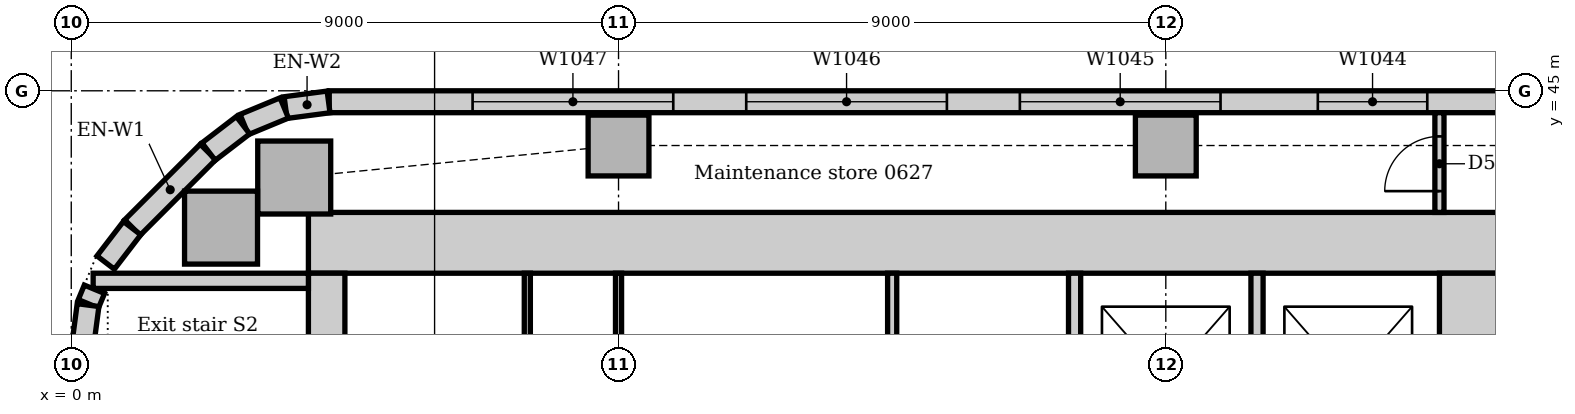
"""IFC4 building model, lengths in metres.
Left out: names, types, materials, properties, quantities, classifications, styles, units other than length and angle.
Written with IfcOpenShell. Run it as: python <this file> out.ifc"""

import sys

from ifc_helpers import new_model, si_unit, direction, frame, frame_2d, origin, origin_2d, place, context, subcontext, project, spatial, rectangle, extrude, element, fill, save


model = new_model("IFC4")
c1 = context("Model", 3, precision=1e-05, world=origin(), true_north=direction((0.0, 1.0)))
c2 = subcontext(c1, "Body", "Model", "MODEL_VIEW")
j1 = project(units=[si_unit("LENGTHUNIT", "METRE"), si_unit("PLANEANGLEUNIT", "RADIAN")], contexts=[c1])
p1 = place(None, origin())
s1 = spatial("IfcSite", under=j1, at=p1, CompositionType="ELEMENT")
p2 = place(p1, origin())
s2 = spatial("IfcBuilding", under=s1, at=p2, CompositionType="ELEMENT")
p3 = place(p2, frame((0.0, 0.0, 30.0)))
s3 = spatial("IfcBuildingStorey", under=s2, at=p3, CompositionType="ELEMENT", Elevation=30.0)
p4 = place(p3, frame((23.5, 42.5, 0.0), z_axis=(0.0, 0.0, 1.0), x_axis=(-1.0, 0.0, 0.0)))
e1 = element("IfcWall", 1, at=p4, inside=s3, PredefinedType="SOLIDWALL", context=c2, shape_type="SweptSolid", body=[
    extrude(rectangle(XDim=19.6, YDim=1.0, at=frame_2d((9.8, 0.0))), origin(), (0.0, 0.0, 1.0), 4.0),
])
p5 = place(p3, frame((23.0, 31.5, 0.0), z_axis=(0.0, 0.0, 1.0), x_axis=(0.0, 1.0, 0.0)))
e2 = element("IfcWall", 2, at=p5, inside=s3, PredefinedType="SOLIDWALL", context=c2, shape_type="SweptSolid", body=[
    extrude(rectangle(XDim=10.5, YDim=1.0, at=frame_2d((5.25, 0.0))), origin(), (0.0, 0.0, 1.0), 4.0),
])
p6 = place(p5, frame((3.15, 0.0, 0.0)))
e3 = element("IfcOpeningElement", 3, at=p6, cuts=e2, PredefinedType="OPENING", context=c2, shape_type="SweptSolid", body=[
    extrude(rectangle(XDim=1.0, YDim=2.1, at=frame_2d((0.5, 1.05))), frame((0.0, 0.51, 0.0), z_axis=(0.0, -1.0, 0.0), x_axis=(1.0, 0.0, 0.0)), (0.0, 0.0, 1.0), 1.02),
])
p7 = place(p5, frame((5.2, 0.0, 0.0)))
e4 = element("IfcOpeningElement", 4, at=p7, cuts=e2, PredefinedType="OPENING", context=c2, shape_type="SweptSolid", body=[
    extrude(rectangle(XDim=1.0, YDim=2.1, at=frame_2d((0.5, 1.05))), frame((0.0, 0.51, 0.0), z_axis=(0.0, -1.0, 0.0), x_axis=(1.0, 0.0, 0.0)), (0.0, 0.0, 1.0), 1.02),
])
p8 = place(p3, frame((4.2, 42.0, 0.0), z_axis=(0.0, 0.0, 1.0), x_axis=(0.0, -1.0, 0.0)))
e5 = element("IfcWall", 5, at=p8, inside=s3, PredefinedType="SOLIDWALL", context=c2, shape_type="SweptSolid", body=[
    extrude(rectangle(XDim=10.5, YDim=0.6, at=frame_2d((5.25, 0.0))), origin(), (0.0, 0.0, 1.0), 4.0),
])
p9 = place(p8, frame((5.3, 0.0, 0.0)))
e6 = element("IfcOpeningElement", 6, at=p9, cuts=e5, PredefinedType="OPENING", context=c2, shape_type="SweptSolid", body=[
    extrude(rectangle(XDim=1.0, YDim=2.1, at=frame_2d((0.5, 1.05))), frame((0.0, 0.31, 0.0), z_axis=(0.0, -1.0, 0.0), x_axis=(1.0, 0.0, 0.0)), (0.0, 0.0, 1.0), 0.62),
])
p10 = place(p3, frame((3.9, 41.875, 0.0), z_axis=(0.0, 0.0, 1.0), x_axis=(-1.0, 0.0, 0.0)))
e7 = element("IfcWall", 7, at=p10, inside=s3, PredefinedType="SOLIDWALL", context=c2, shape_type="SweptSolid", body=[
    extrude(rectangle(XDim=3.54, YDim=0.25, at=frame_2d((1.77, 0.0))), origin(), (0.0, 0.0, 1.0), 4.0),
])
for number, where, z_axis, x_axis in (
    (8, (3.667, 43.574, 0.0), (0.0, 0.0, 1.0), (1.0, 0.0, 0.0)),
    (9, (2.463, 42.75, 0.0), (0.0, 0.0, 1.0), (1.0, 0.0, 0.0)),
):
    element("IfcColumn", number, at=place(p3, frame(where, z_axis=z_axis, x_axis=x_axis)), inside=s3, PredefinedType="COLUMN", context=c2, shape_type="SweptSolid", body=[
        extrude(rectangle(XDim=1.2, YDim=1.2, at=origin_2d()), origin(), (0.0, 0.0, 1.0), 3.85),
    ])
for number, where, z_axis, x_axis in (
    (10, (9.0, 44.1, 0.0), (0.0, 0.0, 1.0), (1.0, 0.0, 0.0)),
    (11, (18.0, 44.1, 0.0), (0.0, 0.0, 1.0), (1.0, 0.0, 0.0)),
):
    element("IfcColumn", number, at=place(p3, frame(where, z_axis=z_axis, x_axis=x_axis)), inside=s3, PredefinedType="COLUMN", context=c2, shape_type="SweptSolid", body=[
        extrude(rectangle(XDim=1.0, YDim=1.0, at=origin_2d()), origin(), (0.0, 0.0, 1.0), 3.85),
    ])
p11 = place(p3, frame((48.257, 44.82, 0.0), z_axis=(0.0, 0.0, 1.0), x_axis=(-1.0, 0.0, 0.0)))
e12 = element("IfcWall", 12, at=p11, inside=s3, PredefinedType="STANDARD", context=c2, shape_type="SweptSolid", body=[
    extrude(rectangle(XDim=44.015, YDim=0.36, at=frame_2d((22.007, 0.0))), origin(), (0.0, 0.0, 1.0), 3.85),
])
p12 = place(p11, frame((2.057, 0.0, 0.9)))
e13 = element("IfcOpeningElement", 13, at=p12, cuts=e12, PredefinedType="OPENING", context=c2, shape_type="SweptSolid", body=[
    extrude(rectangle(XDim=3.3, YDim=1.6, at=frame_2d((1.65, 0.8))), frame((0.0, 0.19, 0.0), z_axis=(0.0, -1.0, 0.0), x_axis=(1.0, 0.0, 0.0)), (0.0, 0.0, 1.0), 0.38),
])
p13 = place(p11, frame((6.857, 0.0, 0.9)))
e14 = element("IfcOpeningElement", 14, at=p13, cuts=e12, PredefinedType="OPENING", context=c2, shape_type="SweptSolid", body=[
    extrude(rectangle(XDim=3.3, YDim=1.6, at=frame_2d((1.65, 0.8))), frame((0.0, 0.19, 0.0), z_axis=(0.0, -1.0, 0.0), x_axis=(1.0, 0.0, 0.0)), (0.0, 0.0, 1.0), 0.38),
])
p14 = place(p11, frame((11.357, 0.0, 0.9)))
e15 = element("IfcOpeningElement", 15, at=p14, cuts=e12, PredefinedType="OPENING", context=c2, shape_type="SweptSolid", body=[
    extrude(rectangle(XDim=3.3, YDim=1.6, at=frame_2d((1.65, 0.8))), frame((0.0, 0.19, 0.0), z_axis=(0.0, -1.0, 0.0), x_axis=(1.0, 0.0, 0.0)), (0.0, 0.0, 1.0), 0.38),
])
p15 = place(p11, frame((15.857, 0.0, 0.9)))
e16 = element("IfcOpeningElement", 16, at=p15, cuts=e12, PredefinedType="OPENING", context=c2, shape_type="SweptSolid", body=[
    extrude(rectangle(XDim=3.3, YDim=1.6, at=frame_2d((1.65, 0.8))), frame((0.0, 0.19, 0.0), z_axis=(0.0, -1.0, 0.0), x_axis=(1.0, 0.0, 0.0)), (0.0, 0.0, 1.0), 0.38),
])
p16 = place(p11, frame((20.357, 0.0, 0.9)))
e17 = element("IfcOpeningElement", 17, at=p16, cuts=e12, PredefinedType="OPENING", context=c2, shape_type="SweptSolid", body=[
    extrude(rectangle(XDim=3.3, YDim=1.6, at=frame_2d((1.65, 0.8))), frame((0.0, 0.19, 0.0), z_axis=(0.0, -1.0, 0.0), x_axis=(1.0, 0.0, 0.0)), (0.0, 0.0, 1.0), 0.38),
])
p17 = place(p11, frame((25.957, 0.0, 0.9)))
e18 = element("IfcOpeningElement", 18, at=p17, cuts=e12, PredefinedType="OPENING", context=c2, shape_type="SweptSolid", body=[
    extrude(rectangle(XDim=1.8, YDim=1.6, at=frame_2d((0.9, 0.8))), frame((0.0, 0.19, 0.0), z_axis=(0.0, -1.0, 0.0), x_axis=(1.0, 0.0, 0.0)), (0.0, 0.0, 1.0), 0.38),
])
p18 = place(p11, frame((29.357, 0.0, 0.9)))
e19 = element("IfcOpeningElement", 19, at=p18, cuts=e12, PredefinedType="OPENING", context=c2, shape_type="SweptSolid", body=[
    extrude(rectangle(XDim=3.3, YDim=1.6, at=frame_2d((1.65, 0.8))), frame((0.0, 0.19, 0.0), z_axis=(0.0, -1.0, 0.0), x_axis=(1.0, 0.0, 0.0)), (0.0, 0.0, 1.0), 0.38),
])
p19 = place(p11, frame((33.857, 0.0, 0.9)))
e20 = element("IfcOpeningElement", 20, at=p19, cuts=e12, PredefinedType="OPENING", context=c2, shape_type="SweptSolid", body=[
    extrude(rectangle(XDim=3.3, YDim=1.6, at=frame_2d((1.65, 0.8))), frame((0.0, 0.19, 0.0), z_axis=(0.0, -1.0, 0.0), x_axis=(1.0, 0.0, 0.0)), (0.0, 0.0, 1.0), 0.38),
])
p20 = place(p11, frame((38.357, 0.0, 0.9)))
e21 = element("IfcOpeningElement", 21, at=p20, cuts=e12, PredefinedType="OPENING", context=c2, shape_type="SweptSolid", body=[
    extrude(rectangle(XDim=3.3, YDim=1.6, at=frame_2d((1.65, 0.8))), frame((0.0, 0.19, 0.0), z_axis=(0.0, -1.0, 0.0), x_axis=(1.0, 0.0, 0.0)), (0.0, 0.0, 1.0), 0.38),
])
p21 = place(p3, frame((2.249, 43.994, 0.0), z_axis=(0.0, 0.0, 1.0), x_axis=(-0.707106781187, -0.707106781187, 0.0)))
e22 = element("IfcWall", 22, at=p21, inside=s3, PredefinedType="STANDARD", context=c2, shape_type="SweptSolid", body=[
    extrude(rectangle(XDim=1.757, YDim=0.36, at=frame_2d((0.879, 0.0))), origin(), (0.0, 0.0, 1.0), 3.85),
])
for number, where, z_axis, x_axis in (
    (23, (4.231, 44.817, 0.0), (0.0, 0.0, 1.0), (-0.991, -0.131, 0.0)),
    (24, (3.503, 44.718, 0.0), (0.0, 0.0, 1.0), (-0.924, -0.383, 0.0)),
):
    element("IfcWall", number, at=place(p3, frame(where, z_axis=z_axis, x_axis=x_axis)), inside=s3, PredefinedType="STANDARD", context=c2, shape_type="SweptSolid", body=[
        extrude(rectangle(XDim=0.713, YDim=0.36, at=frame_2d((0.356, 0.0))), origin(), (0.0, 0.0, 1.0), 3.85),
    ])
for number, where, z_axis, x_axis in (
    (25, (2.825, 44.434, 0.0), (0.0, 0.0, 1.0), (-0.793, -0.609, 0.0)),
    (26, (1.0, 42.741, 0.0), (0.0, 0.0, 1.0), (-0.609, -0.793, 0.0)),
):
    element("IfcWall", number, at=place(p3, frame(where, z_axis=z_axis, x_axis=x_axis)), inside=s3, PredefinedType="STANDARD", context=c2, shape_type="SweptSolid", body=[
        extrude(rectangle(XDim=0.713, YDim=0.36, at=frame_2d((0.357, 0.0))), origin(), (0.0, 0.0, 1.0), 3.85),
    ])
p22 = place(p3, frame((0.381, 41.736, 0.0), z_axis=(0.0, 0.0, 1.0), x_axis=(-0.382773360986, -0.923842277729, 0.0)))
e27 = element("IfcWall", 27, at=p22, inside=s3, PredefinedType="STANDARD", context=c2, shape_type="SweptSolid", body=[
    extrude(rectangle(XDim=0.258, YDim=0.36, at=frame_2d((0.129, 0.0))), origin(), (0.0, 0.0, 1.0), 3.85),
])
p23 = place(p3, frame((0.276, 41.476, 0.0), z_axis=(0.0, 0.0, 1.0), x_axis=(-0.13055608231, -0.99144092581, 0.0)))
e28 = element("IfcWall", 28, at=p23, inside=s3, PredefinedType="STANDARD", context=c2, shape_type="SweptSolid", body=[
    extrude(rectangle(XDim=0.713, YDim=0.36, at=frame_2d((0.356, 0.0))), origin(), (0.0, 0.0, 1.0), 3.85),
])
for number, where, z_axis, x_axis in (
    (29, (16.5, 38.6, 0.0), (0.0, 0.0, 1.0), (0.0, 1.0, 0.0)),
    (30, (19.5, 38.6, 0.0), (0.0, 0.0, 1.0), (0.0, 1.0, 0.0)),
):
    element("IfcWall", number, at=place(p3, frame(where, z_axis=z_axis, x_axis=x_axis)), inside=s3, PredefinedType="PARTITIONING", context=c2, shape_type="SweptSolid", body=[
        extrude(rectangle(XDim=3.4, YDim=0.2, at=frame_2d((1.7, 0.0))), origin(), (0.0, 0.0, 1.0), 3.85),
    ])
p24 = place(p3, frame((22.5, 43.0, 0.0), z_axis=(0.0, 0.0, 1.0), x_axis=(0.0, 1.0, 0.0)))
e31 = element("IfcWall", 31, at=p24, inside=s3, PredefinedType="PARTITIONING", context=c2, shape_type="SweptSolid", body=[
    extrude(rectangle(XDim=1.64, YDim=0.15, at=frame_2d((0.82, 0.0))), origin(), (0.0, 0.0, 1.0), 3.85),
])
p25 = place(p24, frame((0.35, 0.0, 0.0)))
e32 = element("IfcOpeningElement", 32, at=p25, cuts=e31, PredefinedType="OPENING", context=c2, shape_type="SweptSolid", body=[
    extrude(rectangle(XDim=0.9, YDim=2.1, at=frame_2d((0.45, 1.05))), frame((0.0, 0.085, 0.0), z_axis=(0.0, -1.0, 0.0), x_axis=(1.0, 0.0, 0.0)), (0.0, 0.0, 1.0), 0.17),
])
p26 = place(p3, frame((13.5, 38.575, 0.0), z_axis=(0.0, 0.0, 1.0), x_axis=(0.0, 1.0, 0.0)))
e33 = element("IfcWall", 33, at=p26, inside=s3, PredefinedType="PARTITIONING", context=c2, shape_type="SweptSolid", body=[
    extrude(rectangle(XDim=3.425, YDim=0.15, at=frame_2d((1.712, 0.0))), origin(), (0.0, 0.0, 1.0), 3.85),
])
for number, where, z_axis, x_axis in (
    (34, (7.5, 38.575, 0.0), (0.0, 0.0, 1.0), (0.0, 1.0, 0.0)),
    (35, (9.0, 38.575, 0.0), (0.0, 0.0, 1.0), (0.0, 1.0, 0.0)),
):
    element("IfcWall", number, at=place(p3, frame(where, z_axis=z_axis, x_axis=x_axis)), inside=s3, PredefinedType="PARTITIONING", context=c2, shape_type="SweptSolid", body=[
        extrude(rectangle(XDim=3.425, YDim=0.1, at=frame_2d((1.712, 0.0))), origin(), (0.0, 0.0, 1.0), 3.85),
    ])
p27 = place(p17, origin())
e36 = element("IfcWindow", 36, at=p27, inside=s3, PartitioningType="SINGLE_PANEL", PredefinedType="WINDOW", context=c2, shape_type="SweptSolid", body=[
    extrude(rectangle(XDim=1.8, YDim=1.6, at=frame_2d((0.9, 0.8))), frame((0.0, 0.13, 0.0), z_axis=(0.0, -1.0, 0.0), x_axis=(1.0, 0.0, 0.0)), (0.0, 0.0, 1.0), 0.06),
])
fill(e18, e36)
p28 = place(p18, origin())
e37 = element("IfcWindow", 37, at=p28, inside=s3, PartitioningType="SINGLE_PANEL", PredefinedType="WINDOW", context=c2, shape_type="SweptSolid", body=[
    extrude(rectangle(XDim=3.3, YDim=1.6, at=frame_2d((1.65, 0.8))), frame((0.0, 0.13, 0.0), z_axis=(0.0, -1.0, 0.0), x_axis=(1.0, 0.0, 0.0)), (0.0, 0.0, 1.0), 0.06),
])
fill(e19, e37)
p29 = place(p19, origin())
e38 = element("IfcWindow", 38, at=p29, inside=s3, PartitioningType="SINGLE_PANEL", PredefinedType="WINDOW", context=c2, shape_type="SweptSolid", body=[
    extrude(rectangle(XDim=3.3, YDim=1.6, at=frame_2d((1.65, 0.8))), frame((0.0, 0.13, 0.0), z_axis=(0.0, -1.0, 0.0), x_axis=(1.0, 0.0, 0.0)), (0.0, 0.0, 1.0), 0.06),
])
fill(e20, e38)
p30 = place(p20, origin())
e39 = element("IfcWindow", 39, at=p30, inside=s3, PartitioningType="SINGLE_PANEL", PredefinedType="WINDOW", context=c2, shape_type="SweptSolid", body=[
    extrude(rectangle(XDim=3.3, YDim=1.6, at=frame_2d((1.65, 0.8))), frame((0.0, 0.13, 0.0), z_axis=(0.0, -1.0, 0.0), x_axis=(1.0, 0.0, 0.0)), (0.0, 0.0, 1.0), 0.06),
])
fill(e21, e39)
p31 = place(p25, origin())
e40 = element("IfcDoor", 40, at=p31, inside=s3, OperationType="SINGLE_SWING_LEFT", PredefinedType="DOOR", context=c2, shape_type="SweptSolid", body=[
    extrude(rectangle(XDim=0.9, YDim=2.1, at=frame_2d((0.45, 1.05))), frame((0.0, 0.025, 0.0), z_axis=(0.0, -1.0, 0.0), x_axis=(1.0, 0.0, 0.0)), (0.0, 0.0, 1.0), 0.05),
])
fill(e32, e40)
save(model, sys.argv[1])
